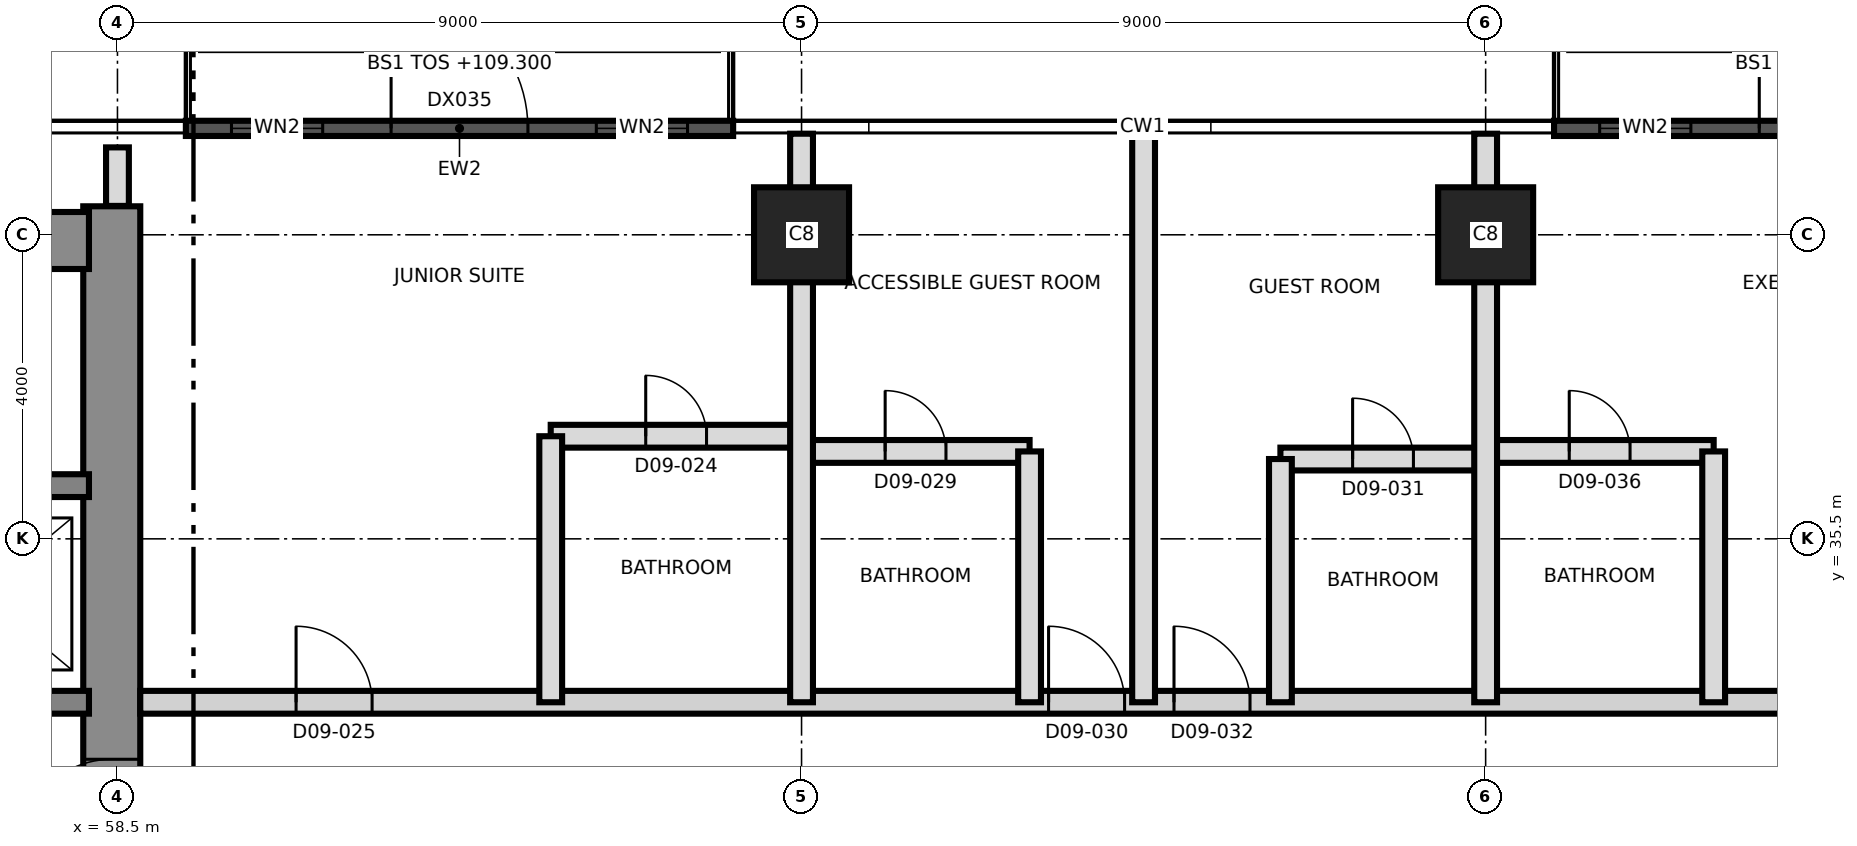
"""IFC4 building model, lengths in metres.
Left out: names, types, materials, properties, quantities, classifications, styles, units other than length and angle.
Written with IfcOpenShell. Run it as: python <this file> out.ifc"""

import sys

from ifc_helpers import new_model, si_unit, direction, frame, frame_2d, origin, origin_2d, place, context, subcontext, project, spatial, rectangle, extrude, element, fill, save


model = new_model("IFC4")
c1 = context("Model", 3, precision=1e-05, world=origin(), true_north=direction((0.0, 1.0)))
c2 = subcontext(c1, "Body", "Model", "MODEL_VIEW")
j1 = project(units=[si_unit("LENGTHUNIT", "METRE"), si_unit("PLANEANGLEUNIT", "RADIAN")], contexts=[c1])
p1 = place(None, origin())
s1 = spatial("IfcSite", under=j1, at=p1, CompositionType="ELEMENT")
p2 = place(p1, origin())
s2 = spatial("IfcBuilding", under=s1, at=p2, CompositionType="ELEMENT")
p3 = place(p2, frame((0.0, 0.0, 109.3)))
s3 = spatial("IfcBuildingStorey", under=s2, at=p3, CompositionType="ELEMENT", Elevation=109.3)
p4 = place(p3, frame((58.425, 21.125, 0.0), z_axis=(0.0, 0.0, 1.0), x_axis=(0.0, 1.0, 0.0)))
e1 = element("IfcWall", 1, at=p4, inside=s3, PredefinedType="SHEAR", context=c2, shape_type="SweptSolid", body=[
    extrude(rectangle(XDim=18.75, YDim=0.75, at=frame_2d((9.375, 0.0))), origin(), (0.0, 0.0, 1.0), 3.7),
])
p5 = place(p4, frame((10.275, 0.0, 0.0)))
e2 = element("IfcOpeningElement", 2, at=p5, cuts=e1, PredefinedType="OPENING", context=c2, shape_type="SweptSolid", body=[
    extrude(rectangle(XDim=1.2, YDim=2.1, at=frame_2d((0.6, 1.05))), frame((0.0, 0.385, 0.0), z_axis=(0.0, -1.0, 0.0), x_axis=(1.0, 0.0, 0.0)), (0.0, 0.0, 1.0), 0.77),
])
p6 = place(p3, frame((31.125, 39.425, 0.0), z_axis=(0.0, 0.0, 1.0), x_axis=(1.0, 0.0, 0.0)))
e3 = element("IfcWall", 3, at=p6, inside=s3, PredefinedType="SHEAR", context=c2, shape_type="SweptSolid", body=[
    extrude(rectangle(XDim=27.0, YDim=0.75, at=frame_2d((13.5, 0.0))), origin(), (0.0, 0.0, 1.0), 3.7),
])
p7 = place(p6, frame((10.575, 0.0, 0.0)))
e4 = element("IfcOpeningElement", 4, at=p7, cuts=e3, PredefinedType="OPENING", context=c2, shape_type="SweptSolid", body=[
    extrude(rectangle(XDim=1.2, YDim=2.1, at=frame_2d((0.6, 1.05))), frame((0.0, 0.385, 0.0), z_axis=(0.0, -1.0, 0.0), x_axis=(1.0, 0.0, 0.0)), (0.0, 0.0, 1.0), 0.77),
])
p8 = place(p3, frame((31.875, 33.35, 0.0), z_axis=(0.0, 0.0, 1.0), x_axis=(1.0, 0.0, 0.0)))
e5 = element("IfcWall", 5, at=p8, inside=s3, PredefinedType="SHEAR", context=c2, shape_type="SweptSolid", body=[
    extrude(rectangle(XDim=26.25, YDim=0.3, at=frame_2d((13.125, 0.0))), origin(), (0.0, 0.0, 1.0), 3.7),
])
p9 = place(p8, frame((13.775, 0.0, 0.0)))
e6 = element("IfcOpeningElement", 6, at=p9, cuts=e5, PredefinedType="OPENING", context=c2, shape_type="SweptSolid", body=[
    extrude(rectangle(XDim=1.4, YDim=2.1, at=frame_2d((0.7, 1.05))), frame((0.0, 0.16, 0.0), z_axis=(0.0, -1.0, 0.0), x_axis=(1.0, 0.0, 0.0)), (0.0, 0.0, 1.0), 0.32),
])
p10 = place(p8, frame((5.25, 0.0, 0.0)))
e7 = element("IfcOpeningElement", 7, at=p10, cuts=e5, PredefinedType="OPENING", context=c2, shape_type="SweptSolid", body=[
    extrude(rectangle(XDim=1.2, YDim=2.1, at=frame_2d((0.6, 1.05))), frame((0.0, 0.16, 0.0), z_axis=(0.0, -1.0, 0.0), x_axis=(1.0, 0.0, 0.0)), (0.0, 0.0, 1.0), 0.32),
])
p11 = place(p8, frame((19.8, 0.0, 0.0)))
e8 = element("IfcOpeningElement", 8, at=p11, cuts=e5, PredefinedType="OPENING", context=c2, shape_type="SweptSolid", body=[
    extrude(rectangle(XDim=1.2, YDim=2.1, at=frame_2d((0.6, 1.05))), frame((0.0, 0.16, 0.0), z_axis=(0.0, -1.0, 0.0), x_axis=(1.0, 0.0, 0.0)), (0.0, 0.0, 1.0), 0.32),
])
p12 = place(p3, frame((43.5, 36.2, 0.0), z_axis=(0.0, 0.0, 1.0), x_axis=(1.0, 0.0, 0.0)))
e9 = element("IfcWall", 9, at=p12, inside=s3, PredefinedType="SHEAR", context=c2, shape_type="SweptSolid", body=[
    extrude(rectangle(XDim=14.625, YDim=0.3, at=frame_2d((7.312, 0.0))), origin(), (0.0, 0.0, 1.0), 3.7),
])
p13 = place(p12, frame((6.9, 0.0, 0.0)))
e10 = element("IfcOpeningElement", 10, at=p13, cuts=e9, PredefinedType="OPENING", context=c2, shape_type="SweptSolid", body=[
    extrude(rectangle(XDim=1.2, YDim=2.1, at=frame_2d((0.6, 1.05))), frame((0.0, 0.16, 0.0), z_axis=(0.0, -1.0, 0.0), x_axis=(1.0, 0.0, 0.0)), (0.0, 0.0, 1.0), 0.32),
])
p14 = place(p12, frame((0.7, 0.0, 0.0)))
e11 = element("IfcOpeningElement", 11, at=p14, cuts=e9, PredefinedType="OPENING", context=c2, shape_type="SweptSolid", body=[
    extrude(rectangle(XDim=1.3, YDim=2.4, at=frame_2d((0.65, 1.2))), frame((0.0, 0.16, 0.0), z_axis=(0.0, -1.0, 0.0), x_axis=(1.0, 0.0, 0.0)), (0.0, 0.0, 1.0), 0.32),
])
p15 = place(p12, frame((3.7, 0.0, 0.0)))
e12 = element("IfcOpeningElement", 12, at=p15, cuts=e9, PredefinedType="OPENING", context=c2, shape_type="SweptSolid", body=[
    extrude(rectangle(XDim=1.3, YDim=2.4, at=frame_2d((0.65, 1.2))), frame((0.0, 0.16, 0.0), z_axis=(0.0, -1.0, 0.0), x_axis=(1.0, 0.0, 0.0)), (0.0, 0.0, 1.0), 0.32),
])
for number, where, z_axis, x_axis in (
    (13, (67.5, 39.5, 0.0), (0.0, 0.0, 1.0), (1.0, 0.0, 0.0)),
    (14, (76.5, 39.5, 0.0), (0.0, 0.0, 1.0), (1.0, 0.0, 0.0)),
):
    element("IfcColumn", number, at=place(p3, frame(where, z_axis=z_axis, x_axis=x_axis)), inside=s3, PredefinedType="COLUMN", context=c2, shape_type="SweptSolid", body=[
        extrude(rectangle(XDim=1.25, YDim=1.25, at=origin_2d()), origin(), (0.0, 0.0, 1.0), 3.7),
    ])
p16 = place(p3, frame((77.4, 40.9, 0.0), z_axis=(0.0, 0.0, 1.0), x_axis=(1.0, 0.0, 0.0)))
e15 = element("IfcWall", 15, at=p16, inside=s3, PredefinedType="SOLIDWALL", context=c2, shape_type="SweptSolid", body=[
    extrude(rectangle(XDim=7.2, YDim=0.2, at=frame_2d((3.6, 0.0))), origin(), (0.0, 0.0, 1.0), 3.4),
])
p17 = place(p16, frame((2.7, 0.0, 0.0)))
e16 = element("IfcOpeningElement", 16, at=p17, cuts=e15, PredefinedType="OPENING", context=c2, shape_type="SweptSolid", body=[
    extrude(rectangle(XDim=1.8, YDim=2.4, at=frame_2d((0.9, 1.2))), frame((0.0, 0.11, 0.0), z_axis=(0.0, -1.0, 0.0), x_axis=(1.0, 0.0, 0.0)), (0.0, 0.0, 1.0), 0.22),
])
p18 = place(p16, frame((5.4, 0.0, 0.9)))
e17 = element("IfcOpeningElement", 17, at=p18, cuts=e15, PredefinedType="OPENING", context=c2, shape_type="SweptSolid", body=[
    extrude(rectangle(XDim=1.2, YDim=2.1, at=frame_2d((0.6, 1.05))), frame((0.0, 0.11, 0.0), z_axis=(0.0, -1.0, 0.0), x_axis=(1.0, 0.0, 0.0)), (0.0, 0.0, 1.0), 0.22),
])
p19 = place(p16, frame((0.6, 0.0, 0.9)))
e18 = element("IfcOpeningElement", 18, at=p19, cuts=e15, PredefinedType="OPENING", context=c2, shape_type="SweptSolid", body=[
    extrude(rectangle(XDim=1.2, YDim=2.1, at=frame_2d((0.6, 1.05))), frame((0.0, 0.11, 0.0), z_axis=(0.0, -1.0, 0.0), x_axis=(1.0, 0.0, 0.0)), (0.0, 0.0, 1.0), 0.22),
])
p20 = place(p3, frame((59.4, 40.9, 0.0), z_axis=(0.0, 0.0, 1.0), x_axis=(1.0, 0.0, 0.0)))
e19 = element("IfcWall", 19, at=p20, inside=s3, PredefinedType="SOLIDWALL", context=c2, shape_type="SweptSolid", body=[
    extrude(rectangle(XDim=7.2, YDim=0.2, at=frame_2d((3.6, 0.0))), origin(), (0.0, 0.0, 1.0), 3.4),
])
p21 = place(p20, frame((2.7, 0.0, 0.0)))
e20 = element("IfcOpeningElement", 20, at=p21, cuts=e19, PredefinedType="OPENING", context=c2, shape_type="SweptSolid", body=[
    extrude(rectangle(XDim=1.8, YDim=2.4, at=frame_2d((0.9, 1.2))), frame((0.0, 0.11, 0.0), z_axis=(0.0, -1.0, 0.0), x_axis=(1.0, 0.0, 0.0)), (0.0, 0.0, 1.0), 0.22),
])
p22 = place(p20, frame((5.4, 0.0, 0.9)))
e21 = element("IfcOpeningElement", 21, at=p22, cuts=e19, PredefinedType="OPENING", context=c2, shape_type="SweptSolid", body=[
    extrude(rectangle(XDim=1.2, YDim=2.1, at=frame_2d((0.6, 1.05))), frame((0.0, 0.11, 0.0), z_axis=(0.0, -1.0, 0.0), x_axis=(1.0, 0.0, 0.0)), (0.0, 0.0, 1.0), 0.22),
])
p23 = place(p20, frame((0.6, 0.0, 0.9)))
e22 = element("IfcOpeningElement", 22, at=p23, cuts=e19, PredefinedType="OPENING", context=c2, shape_type="SweptSolid", body=[
    extrude(rectangle(XDim=1.2, YDim=2.1, at=frame_2d((0.6, 1.05))), frame((0.0, 0.11, 0.0), z_axis=(0.0, -1.0, 0.0), x_axis=(1.0, 0.0, 0.0)), (0.0, 0.0, 1.0), 0.22),
])
p24 = place(p3, frame((58.8, 33.35, 0.0), z_axis=(0.0, 0.0, 1.0), x_axis=(1.0, 0.0, 0.0)))
e23 = element("IfcWall", 23, at=p24, inside=s3, PredefinedType="PARTITIONING", context=c2, shape_type="SweptSolid", body=[
    extrude(rectangle(XDim=26.53, YDim=0.3, at=frame_2d((13.265, 0.0))), origin(), (0.0, 0.0, 1.0), 3.4),
])
p25 = place(p24, frame((2.05, 0.0, 0.0)))
e24 = element("IfcOpeningElement", 24, at=p25, cuts=e23, PredefinedType="OPENING", context=c2, shape_type="SweptSolid", body=[
    extrude(rectangle(XDim=1.0, YDim=2.4, at=frame_2d((0.5, 1.2))), frame((0.0, 0.16, 0.0), z_axis=(0.0, -1.0, 0.0), x_axis=(1.0, 0.0, 0.0)), (0.0, 0.0, 1.0), 0.32),
])
p26 = place(p24, frame((11.95, 0.0, 0.0)))
e25 = element("IfcOpeningElement", 25, at=p26, cuts=e23, PredefinedType="OPENING", context=c2, shape_type="SweptSolid", body=[
    extrude(rectangle(XDim=1.0, YDim=2.1, at=frame_2d((0.5, 1.05))), frame((0.0, 0.16, 0.0), z_axis=(0.0, -1.0, 0.0), x_axis=(1.0, 0.0, 0.0)), (0.0, 0.0, 1.0), 0.32),
])
p27 = place(p24, frame((13.6, 0.0, 0.0)))
e26 = element("IfcOpeningElement", 26, at=p27, cuts=e23, PredefinedType="OPENING", context=c2, shape_type="SweptSolid", body=[
    extrude(rectangle(XDim=1.0, YDim=2.1, at=frame_2d((0.5, 1.05))), frame((0.0, 0.16, 0.0), z_axis=(0.0, -1.0, 0.0), x_axis=(1.0, 0.0, 0.0)), (0.0, 0.0, 1.0), 0.32),
])
p28 = place(p24, frame((21.7, 0.0, 0.0)))
e27 = element("IfcOpeningElement", 27, at=p28, cuts=e23, PredefinedType="OPENING", context=c2, shape_type="SweptSolid", body=[
    extrude(rectangle(XDim=1.0, YDim=2.4, at=frame_2d((0.5, 1.2))), frame((0.0, 0.16, 0.0), z_axis=(0.0, -1.0, 0.0), x_axis=(1.0, 0.0, 0.0)), (0.0, 0.0, 1.0), 0.32),
])
p29 = place(p3, frame((73.8, 36.55, 0.0), z_axis=(0.0, 0.0, 1.0), x_axis=(1.0, 0.0, 0.0)))
e28 = element("IfcWall", 28, at=p29, inside=s3, PredefinedType="PARTITIONING", context=c2, shape_type="SweptSolid", body=[
    extrude(rectangle(XDim=2.7, YDim=0.3, at=frame_2d((1.35, 0.0))), origin(), (0.0, 0.0, 1.0), 3.4),
])
p30 = place(p29, frame((0.95, 0.0, 0.0)))
e29 = element("IfcOpeningElement", 29, at=p30, cuts=e28, PredefinedType="OPENING", context=c2, shape_type="SweptSolid", body=[
    extrude(rectangle(XDim=0.8, YDim=2.1, at=frame_2d((0.4, 1.05))), frame((0.0, 0.16, 0.0), z_axis=(0.0, -1.0, 0.0), x_axis=(1.0, 0.0, 0.0)), (0.0, 0.0, 1.0), 0.32),
])
p31 = place(p3, frame((67.5, 36.65, 0.0), z_axis=(0.0, 0.0, 1.0), x_axis=(1.0, 0.0, 0.0)))
e30 = element("IfcWall", 30, at=p31, inside=s3, PredefinedType="PARTITIONING", context=c2, shape_type="SweptSolid", body=[
    extrude(rectangle(XDim=3.0, YDim=0.3, at=frame_2d((1.5, 0.0))), origin(), (0.0, 0.0, 1.0), 3.4),
])
p32 = place(p31, frame((1.1, 0.0, 0.0)))
e31 = element("IfcOpeningElement", 31, at=p32, cuts=e30, PredefinedType="OPENING", context=c2, shape_type="SweptSolid", body=[
    extrude(rectangle(XDim=0.8, YDim=2.1, at=frame_2d((0.4, 1.05))), frame((0.0, 0.16, 0.0), z_axis=(0.0, -1.0, 0.0), x_axis=(1.0, 0.0, 0.0)), (0.0, 0.0, 1.0), 0.32),
])
p33 = place(p3, frame((76.5, 36.65, 0.0), z_axis=(0.0, 0.0, 1.0), x_axis=(1.0, 0.0, 0.0)))
e32 = element("IfcWall", 32, at=p33, inside=s3, PredefinedType="PARTITIONING", context=c2, shape_type="SweptSolid", body=[
    extrude(rectangle(XDim=3.0, YDim=0.3, at=frame_2d((1.5, 0.0))), origin(), (0.0, 0.0, 1.0), 3.4),
])
p34 = place(p33, frame((1.1, 0.0, 0.0)))
e33 = element("IfcOpeningElement", 33, at=p34, cuts=e32, PredefinedType="OPENING", context=c2, shape_type="SweptSolid", body=[
    extrude(rectangle(XDim=0.8, YDim=2.1, at=frame_2d((0.4, 1.05))), frame((0.0, 0.16, 0.0), z_axis=(0.0, -1.0, 0.0), x_axis=(1.0, 0.0, 0.0)), (0.0, 0.0, 1.0), 0.32),
])
p35 = place(p3, frame((64.2, 36.85, 0.0), z_axis=(0.0, 0.0, 1.0), x_axis=(1.0, 0.0, 0.0)))
e34 = element("IfcWall", 34, at=p35, inside=s3, PredefinedType="PARTITIONING", context=c2, shape_type="SweptSolid", body=[
    extrude(rectangle(XDim=3.3, YDim=0.3, at=frame_2d((1.65, 0.0))), origin(), (0.0, 0.0, 1.0), 3.4),
])
p36 = place(p35, frame((1.25, 0.0, 0.0)))
e35 = element("IfcOpeningElement", 35, at=p36, cuts=e34, PredefinedType="OPENING", context=c2, shape_type="SweptSolid", body=[
    extrude(rectangle(XDim=0.8, YDim=2.1, at=frame_2d((0.4, 1.05))), frame((0.0, 0.16, 0.0), z_axis=(0.0, -1.0, 0.0), x_axis=(1.0, 0.0, 0.0)), (0.0, 0.0, 1.0), 0.32),
])
p37 = place(p3, frame((58.5, 39.88, 0.0), z_axis=(0.0, 0.0, 1.0), x_axis=(0.0, 1.0, 0.0)))
e36 = element("IfcWall", 36, at=p37, inside=s3, PredefinedType="PARTITIONING", context=c2, shape_type="SweptSolid", body=[
    extrude(rectangle(XDim=0.77, YDim=0.3, at=frame_2d((0.385, 0.0))), origin(), (0.0, 0.0, 1.0), 3.4),
])
p38 = place(p3, frame((64.2, 33.35, 0.0), z_axis=(0.0, 0.0, 1.0), x_axis=(0.0, 1.0, 0.0)))
e37 = element("IfcWall", 37, at=p38, inside=s3, PredefinedType="PARTITIONING", context=c2, shape_type="SweptSolid", body=[
    extrude(rectangle(XDim=3.5, YDim=0.3, at=frame_2d((1.75, 0.0))), origin(), (0.0, 0.0, 1.0), 3.4),
])
p39 = place(p3, frame((67.5, 33.35, 0.0), z_axis=(0.0, 0.0, 1.0), x_axis=(0.0, 1.0, 0.0)))
e38 = element("IfcWall", 38, at=p39, inside=s3, PredefinedType="PARTITIONING", context=c2, shape_type="SweptSolid", body=[
    extrude(rectangle(XDim=7.48, YDim=0.3, at=frame_2d((3.74, 0.0))), origin(), (0.0, 0.0, 1.0), 3.4),
])
p40 = place(p3, frame((70.5, 33.35, 0.0), z_axis=(0.0, 0.0, 1.0), x_axis=(0.0, 1.0, 0.0)))
e39 = element("IfcWall", 39, at=p40, inside=s3, PredefinedType="PARTITIONING", context=c2, shape_type="SweptSolid", body=[
    extrude(rectangle(XDim=3.3, YDim=0.3, at=frame_2d((1.65, 0.0))), origin(), (0.0, 0.0, 1.0), 3.4),
])
p41 = place(p3, frame((72.0, 33.35, 0.0), z_axis=(0.0, 0.0, 1.0), x_axis=(0.0, 1.0, 0.0)))
e40 = element("IfcWall", 40, at=p41, inside=s3, PredefinedType="PARTITIONING", context=c2, shape_type="SweptSolid", body=[
    extrude(rectangle(XDim=7.48, YDim=0.3, at=frame_2d((3.74, 0.0))), origin(), (0.0, 0.0, 1.0), 3.4),
])
p42 = place(p3, frame((73.8, 33.35, 0.0), z_axis=(0.0, 0.0, 1.0), x_axis=(0.0, 1.0, 0.0)))
e41 = element("IfcWall", 41, at=p42, inside=s3, PredefinedType="PARTITIONING", context=c2, shape_type="SweptSolid", body=[
    extrude(rectangle(XDim=3.2, YDim=0.3, at=frame_2d((1.6, 0.0))), origin(), (0.0, 0.0, 1.0), 3.4),
])
p43 = place(p3, frame((76.5, 33.35, 0.0), z_axis=(0.0, 0.0, 1.0), x_axis=(0.0, 1.0, 0.0)))
e42 = element("IfcWall", 42, at=p43, inside=s3, PredefinedType="PARTITIONING", context=c2, shape_type="SweptSolid", body=[
    extrude(rectangle(XDim=7.48, YDim=0.3, at=frame_2d((3.74, 0.0))), origin(), (0.0, 0.0, 1.0), 3.4),
])
p44 = place(p3, frame((79.5, 33.35, 0.0), z_axis=(0.0, 0.0, 1.0), x_axis=(0.0, 1.0, 0.0)))
e43 = element("IfcWall", 43, at=p44, inside=s3, PredefinedType="PARTITIONING", context=c2, shape_type="SweptSolid", body=[
    extrude(rectangle(XDim=3.3, YDim=0.3, at=frame_2d((1.65, 0.0))), origin(), (0.0, 0.0, 1.0), 3.4),
])
p45 = place(p17, origin())
e44 = element("IfcDoor", 44, at=p45, inside=s3, OperationType="SINGLE_SWING_LEFT", PredefinedType="DOOR", context=c2, shape_type="SweptSolid", body=[
    extrude(rectangle(XDim=1.8, YDim=2.4, at=frame_2d((0.9, 1.2))), frame((0.0, 0.025, 0.0), z_axis=(0.0, -1.0, 0.0), x_axis=(1.0, 0.0, 0.0)), (0.0, 0.0, 1.0), 0.05),
])
fill(e16, e44)
p46 = place(p19, origin())
e45 = element("IfcWindow", 45, at=p46, inside=s3, PartitioningType="SINGLE_PANEL", PredefinedType="WINDOW", context=c2, shape_type="SweptSolid", body=[
    extrude(rectangle(XDim=1.2, YDim=2.1, at=frame_2d((0.6, 1.05))), frame((0.0, 0.03, 0.0), z_axis=(0.0, -1.0, 0.0), x_axis=(1.0, 0.0, 0.0)), (0.0, 0.0, 1.0), 0.06),
])
fill(e18, e45)
p47 = place(p21, origin())
e46 = element("IfcDoor", 46, at=p47, inside=s3, OperationType="SINGLE_SWING_LEFT", PredefinedType="DOOR", context=c2, shape_type="SweptSolid", body=[
    extrude(rectangle(XDim=1.8, YDim=2.4, at=frame_2d((0.9, 1.2))), frame((0.0, 0.025, 0.0), z_axis=(0.0, -1.0, 0.0), x_axis=(1.0, 0.0, 0.0)), (0.0, 0.0, 1.0), 0.05),
])
fill(e20, e46)
p48 = place(p22, origin())
e47 = element("IfcWindow", 47, at=p48, inside=s3, PartitioningType="SINGLE_PANEL", PredefinedType="WINDOW", context=c2, shape_type="SweptSolid", body=[
    extrude(rectangle(XDim=1.2, YDim=2.1, at=frame_2d((0.6, 1.05))), frame((0.0, 0.03, 0.0), z_axis=(0.0, -1.0, 0.0), x_axis=(1.0, 0.0, 0.0)), (0.0, 0.0, 1.0), 0.06),
])
fill(e21, e47)
p49 = place(p23, origin())
e48 = element("IfcWindow", 48, at=p49, inside=s3, PartitioningType="SINGLE_PANEL", PredefinedType="WINDOW", context=c2, shape_type="SweptSolid", body=[
    extrude(rectangle(XDim=1.2, YDim=2.1, at=frame_2d((0.6, 1.05))), frame((0.0, 0.03, 0.0), z_axis=(0.0, -1.0, 0.0), x_axis=(1.0, 0.0, 0.0)), (0.0, 0.0, 1.0), 0.06),
])
fill(e22, e48)
p50 = place(p5, origin())
e49 = element("IfcDoor", 49, at=p50, inside=s3, OperationType="SINGLE_SWING_LEFT", PredefinedType="DOOR", context=c2, shape_type="SweptSolid", body=[
    extrude(rectangle(XDim=1.2, YDim=2.1, at=frame_2d((0.6, 1.05))), frame((0.0, 0.025, 0.0), z_axis=(0.0, -1.0, 0.0), x_axis=(1.0, 0.0, 0.0)), (0.0, 0.0, 1.0), 0.05),
])
fill(e2, e49)
p51 = place(p36, origin())
e50 = element("IfcDoor", 50, at=p51, inside=s3, OperationType="SINGLE_SWING_LEFT", PredefinedType="DOOR", context=c2, shape_type="SweptSolid", body=[
    extrude(rectangle(XDim=0.8, YDim=2.1, at=frame_2d((0.4, 1.05))), frame((0.0, 0.025, 0.0), z_axis=(0.0, -1.0, 0.0), x_axis=(1.0, 0.0, 0.0)), (0.0, 0.0, 1.0), 0.05),
])
fill(e35, e50)
p52 = place(p25, origin())
e51 = element("IfcDoor", 51, at=p52, inside=s3, OperationType="SINGLE_SWING_LEFT", PredefinedType="DOOR", context=c2, shape_type="SweptSolid", body=[
    extrude(rectangle(XDim=1.0, YDim=2.4, at=frame_2d((0.5, 1.2))), frame((0.0, 0.025, 0.0), z_axis=(0.0, -1.0, 0.0), x_axis=(1.0, 0.0, 0.0)), (0.0, 0.0, 1.0), 0.05),
])
fill(e24, e51)
p53 = place(p32, origin())
e52 = element("IfcDoor", 52, at=p53, inside=s3, OperationType="SINGLE_SWING_LEFT", PredefinedType="DOOR", context=c2, shape_type="SweptSolid", body=[
    extrude(rectangle(XDim=0.8, YDim=2.1, at=frame_2d((0.4, 1.05))), frame((0.0, 0.025, 0.0), z_axis=(0.0, -1.0, 0.0), x_axis=(1.0, 0.0, 0.0)), (0.0, 0.0, 1.0), 0.05),
])
fill(e31, e52)
p54 = place(p26, origin())
e53 = element("IfcDoor", 53, at=p54, inside=s3, OperationType="SINGLE_SWING_RIGHT", PredefinedType="DOOR", context=c2, shape_type="SweptSolid", body=[
    extrude(rectangle(XDim=1.0, YDim=2.1, at=frame_2d((0.5, 1.05))), frame((0.0, 0.025, 0.0), z_axis=(0.0, -1.0, 0.0), x_axis=(1.0, 0.0, 0.0)), (0.0, 0.0, 1.0), 0.05),
])
fill(e25, e53)
p55 = place(p30, origin())
e54 = element("IfcDoor", 54, at=p55, inside=s3, OperationType="SINGLE_SWING_RIGHT", PredefinedType="DOOR", context=c2, shape_type="SweptSolid", body=[
    extrude(rectangle(XDim=0.8, YDim=2.1, at=frame_2d((0.4, 1.05))), frame((0.0, 0.025, 0.0), z_axis=(0.0, -1.0, 0.0), x_axis=(1.0, 0.0, 0.0)), (0.0, 0.0, 1.0), 0.05),
])
fill(e29, e54)
p56 = place(p27, origin())
e55 = element("IfcDoor", 55, at=p56, inside=s3, OperationType="SINGLE_SWING_LEFT", PredefinedType="DOOR", context=c2, shape_type="SweptSolid", body=[
    extrude(rectangle(XDim=1.0, YDim=2.1, at=frame_2d((0.5, 1.05))), frame((0.0, 0.025, 0.0), z_axis=(0.0, -1.0, 0.0), x_axis=(1.0, 0.0, 0.0)), (0.0, 0.0, 1.0), 0.05),
])
fill(e26, e55)
p57 = place(p34, origin())
e56 = element("IfcDoor", 56, at=p57, inside=s3, OperationType="SINGLE_SWING_LEFT", PredefinedType="DOOR", context=c2, shape_type="SweptSolid", body=[
    extrude(rectangle(XDim=0.8, YDim=2.1, at=frame_2d((0.4, 1.05))), frame((0.0, 0.025, 0.0), z_axis=(0.0, -1.0, 0.0), x_axis=(1.0, 0.0, 0.0)), (0.0, 0.0, 1.0), 0.05),
])
fill(e33, e56)
save(model, sys.argv[1])
